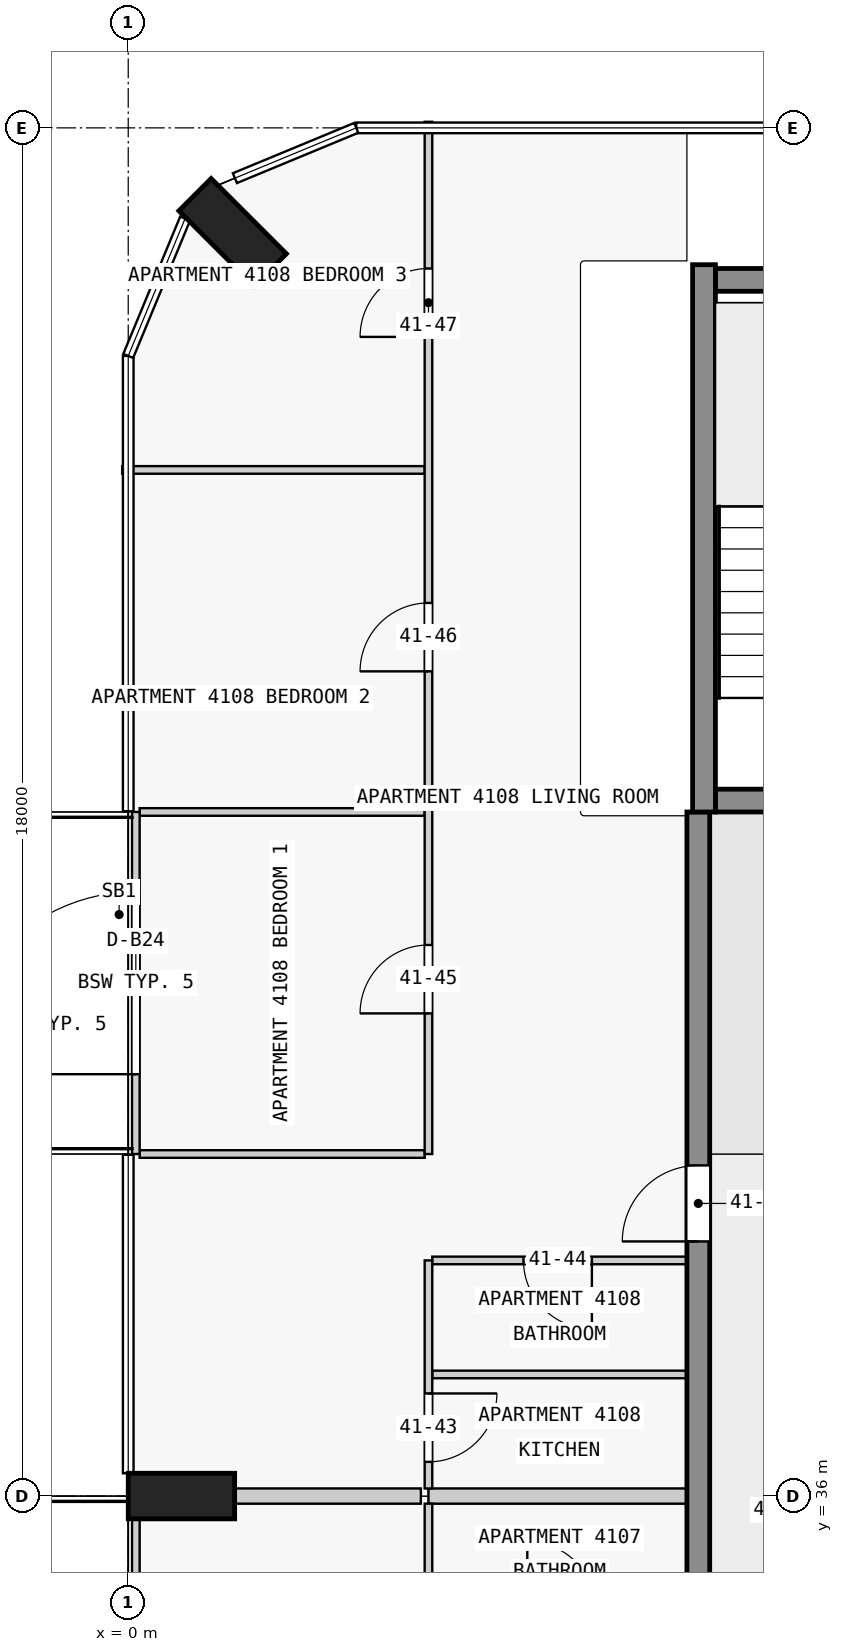
"""IFC4 building model, lengths in metres.
Left out: names, types, materials, properties, quantities, classifications, styles, units other than length and angle.
Written with IfcOpenShell. Run it as: python <this file> out.ifc"""

import sys

from ifc_helpers import new_model, si_unit, direction, frame, frame_2d, origin, origin_2d, place, context, subcontext, project, spatial, rectangle, extrude, element, fill, save


model = new_model("IFC4")
c1 = context("Model", 3, precision=1e-05, world=origin(), true_north=direction((0.0, 1.0)))
c2 = subcontext(c1, "Body", "Model", "MODEL_VIEW")
j1 = project(units=[si_unit("LENGTHUNIT", "METRE"), si_unit("PLANEANGLEUNIT", "RADIAN")], contexts=[c1])
p1 = place(None, origin())
s1 = spatial("IfcSite", under=j1, at=p1, CompositionType="ELEMENT")
p2 = place(p1, origin())
s2 = spatial("IfcBuilding", under=s1, at=p2, CompositionType="ELEMENT")
p3 = place(p2, frame((0.0, 0.0, 160.4)))
s3 = spatial("IfcBuildingStorey", under=s2, at=p3, CompositionType="ELEMENT", Elevation=160.4)
for number, where, z_axis, x_axis in (
    (1, (1.374, 52.626, 0.0), (0.0, 0.0, 1.0), (0.707, 0.707, 0.0)),
    (2, (0.7, 36.0, 0.0), (0.0, 0.0, 1.0), (0.0, 1.0, 0.0)),
):
    element("IfcColumn", number, at=place(p3, frame(where, z_axis=z_axis, x_axis=x_axis)), inside=s3, PredefinedType="COLUMN", context=c2, shape_type="SweptSolid", body=[
        extrude(rectangle(XDim=0.6, YDim=1.4, at=origin_2d()), origin(), (0.0, 0.0, 1.0), 3.5),
    ])
p4 = place(p3, frame((7.725, 45.15, 0.0), z_axis=(0.0, 0.0, 1.0), x_axis=(1.0, 0.0, 0.0)))
e3 = element("IfcWall", 3, at=p4, inside=s3, PredefinedType="SHEAR", context=c2, shape_type="SweptSolid", body=[
    extrude(rectangle(XDim=2.55, YDim=0.3, at=frame_2d((1.275, 0.0))), origin(), (0.0, 0.0, 1.0), 3.5),
])
p5 = place(p4, frame((0.725, 0.0, 0.0)))
e4 = element("IfcOpeningElement", 4, at=p5, cuts=e3, PredefinedType="OPENING", context=c2, shape_type="SweptSolid", body=[
    extrude(rectangle(XDim=1.1, YDim=2.1, at=frame_2d((0.55, 1.05))), frame((0.0, 0.16, 0.0), z_axis=(0.0, -1.0, 0.0), x_axis=(1.0, 0.0, 0.0)), (0.0, 0.0, 1.0), 0.32),
])
p6 = place(p3, frame((7.725, 52.0, 0.0), z_axis=(0.0, 0.0, 1.0), x_axis=(1.0, 0.0, 0.0)))
e5 = element("IfcWall", 5, at=p6, inside=s3, PredefinedType="SHEAR", context=c2, shape_type="SweptSolid", body=[
    extrude(rectangle(XDim=2.55, YDim=0.3, at=frame_2d((1.275, 0.0))), origin(), (0.0, 0.0, 1.0), 3.5),
])
p7 = place(p3, frame((7.575, 45.0, 0.0), z_axis=(0.0, 0.0, 1.0), x_axis=(0.0, 1.0, 0.0)))
e6 = element("IfcWall", 6, at=p7, inside=s3, PredefinedType="SHEAR", context=c2, shape_type="SweptSolid", body=[
    extrude(rectangle(XDim=7.2, YDim=0.3, at=frame_2d((3.6, 0.0))), origin(), (0.0, 0.0, 1.0), 3.5),
])
p8 = place(p3, frame((7.5, 18.0, 0.0), z_axis=(0.0, 0.0, 1.0), x_axis=(0.0, 1.0, 0.0)))
e7 = element("IfcWall", 7, at=p8, inside=s3, PredefinedType="SHEAR", context=c2, shape_type="SweptSolid", body=[
    extrude(rectangle(XDim=27.0, YDim=0.3, at=frame_2d((13.5, 0.0))), origin(), (0.0, 0.0, 1.0), 3.25),
])
p9 = place(p8, frame((1.75, 0.0, 0.0)))
e8 = element("IfcOpeningElement", 8, at=p9, cuts=e7, PredefinedType="OPENING", context=c2, shape_type="SweptSolid", body=[
    extrude(rectangle(XDim=1.0, YDim=2.1, at=frame_2d((0.5, 1.05))), frame((0.0, 0.16, 0.0), z_axis=(0.0, -1.0, 0.0), x_axis=(1.0, 0.0, 0.0)), (0.0, 0.0, 1.0), 0.32),
])
p10 = place(p8, frame((6.25, 0.0, 0.0)))
e9 = element("IfcOpeningElement", 9, at=p10, cuts=e7, PredefinedType="OPENING", context=c2, shape_type="SweptSolid", body=[
    extrude(rectangle(XDim=1.0, YDim=2.1, at=frame_2d((0.5, 1.05))), frame((0.0, 0.16, 0.0), z_axis=(0.0, -1.0, 0.0), x_axis=(1.0, 0.0, 0.0)), (0.0, 0.0, 1.0), 0.32),
])
p11 = place(p8, frame((10.75, 0.0, 0.0)))
e10 = element("IfcOpeningElement", 10, at=p11, cuts=e7, PredefinedType="OPENING", context=c2, shape_type="SweptSolid", body=[
    extrude(rectangle(XDim=1.0, YDim=2.1, at=frame_2d((0.5, 1.05))), frame((0.0, 0.16, 0.0), z_axis=(0.0, -1.0, 0.0), x_axis=(1.0, 0.0, 0.0)), (0.0, 0.0, 1.0), 0.32),
])
p12 = place(p8, frame((15.25, 0.0, 0.0)))
e11 = element("IfcOpeningElement", 11, at=p12, cuts=e7, PredefinedType="OPENING", context=c2, shape_type="SweptSolid", body=[
    extrude(rectangle(XDim=1.0, YDim=2.1, at=frame_2d((0.5, 1.05))), frame((0.0, 0.16, 0.0), z_axis=(0.0, -1.0, 0.0), x_axis=(1.0, 0.0, 0.0)), (0.0, 0.0, 1.0), 0.32),
])
p13 = place(p8, frame((21.35, 0.0, 0.0)))
e12 = element("IfcOpeningElement", 12, at=p13, cuts=e7, PredefinedType="OPENING", context=c2, shape_type="SweptSolid", body=[
    extrude(rectangle(XDim=1.0, YDim=2.1, at=frame_2d((0.5, 1.05))), frame((0.0, 0.16, 0.0), z_axis=(0.0, -1.0, 0.0), x_axis=(1.0, 0.0, 0.0)), (0.0, 0.0, 1.0), 0.32),
])
p14 = place(p3, frame((0.1, 31.5, 0.0), z_axis=(0.0, 0.0, 1.0), x_axis=(0.0, 1.0, 0.0)))
e13 = element("IfcWall", 13, at=p14, inside=s3, PredefinedType="STANDARD", context=c2, shape_type="SweptSolid", body=[
    extrude(rectangle(XDim=4.5, YDim=0.1, at=frame_2d((2.25, 0.0))), origin(), (0.0, 0.0, 1.0), 3.25),
])
p15 = place(p14, frame((1.05, 0.0, 0.0)))
e14 = element("IfcOpeningElement", 14, at=p15, cuts=e13, PredefinedType="OPENING", context=c2, shape_type="SweptSolid", body=[
    extrude(rectangle(XDim=2.4, YDim=2.4, at=frame_2d((1.2, 1.2))), frame((0.0, 0.06, 0.0), z_axis=(0.0, -1.0, 0.0), x_axis=(1.0, 0.0, 0.0)), (0.0, 0.0, 1.0), 0.12),
])
p16 = place(p3, frame((0.1, 40.5, 0.0), z_axis=(0.0, 0.0, 1.0), x_axis=(0.0, 1.0, 0.0)))
e15 = element("IfcWall", 15, at=p16, inside=s3, PredefinedType="STANDARD", context=c2, shape_type="SweptSolid", body=[
    extrude(rectangle(XDim=4.5, YDim=0.1, at=frame_2d((2.25, 0.0))), origin(), (0.0, 0.0, 1.0), 3.25),
])
p17 = place(p16, frame((1.05, 0.0, 0.0)))
e16 = element("IfcOpeningElement", 16, at=p17, cuts=e15, PredefinedType="OPENING", context=c2, shape_type="SweptSolid", body=[
    extrude(rectangle(XDim=2.4, YDim=2.4, at=frame_2d((1.2, 1.2))), frame((0.0, 0.06, 0.0), z_axis=(0.0, -1.0, 0.0), x_axis=(1.0, 0.0, 0.0)), (0.0, 0.0, 1.0), 0.12),
])
p18 = place(p3, frame((7.35, 36.0, 0.0), z_axis=(0.0, 0.0, 1.0), x_axis=(-1.0, 0.0, 0.0)))
e17 = element("IfcWall", 17, at=p18, inside=s3, PredefinedType="PARTITIONING", context=c2, shape_type="SweptSolid", body=[
    extrude(rectangle(XDim=3.4, YDim=0.2, at=frame_2d((1.7, 0.0))), origin(), (0.0, 0.0, 1.0), 3.25),
])
p19 = place(p3, frame((1.4, 36.0, 0.0), z_axis=(0.0, 0.0, 1.0), x_axis=(1.0, 0.0, 0.0)))
e18 = element("IfcWall", 18, at=p19, inside=s3, PredefinedType="PARTITIONING", context=c2, shape_type="SweptSolid", body=[
    extrude(rectangle(XDim=2.45, YDim=0.2, at=frame_2d((1.225, 0.0))), origin(), (0.0, 0.0, 1.0), 3.25),
])
p20 = place(p3, frame((7.35, 37.6, 0.0), z_axis=(0.0, 0.0, 1.0), x_axis=(-1.0, 0.0, 0.0)))
e19 = element("IfcWall", 19, at=p20, inside=s3, PredefinedType="PARTITIONING", context=c2, shape_type="SweptSolid", body=[
    extrude(rectangle(XDim=3.35, YDim=0.1, at=frame_2d((1.675, 0.0))), origin(), (0.0, 0.0, 1.0), 3.25),
])
p21 = place(p3, frame((7.35, 39.1, 0.0), z_axis=(0.0, 0.0, 1.0), x_axis=(-1.0, 0.0, 0.0)))
e20 = element("IfcWall", 20, at=p21, inside=s3, PredefinedType="PARTITIONING", context=c2, shape_type="SweptSolid", body=[
    extrude(rectangle(XDim=3.35, YDim=0.1, at=frame_2d((1.675, 0.0))), origin(), (0.0, 0.0, 1.0), 3.25),
])
p22 = place(p21, frame((1.25, 0.0, 0.0)))
e21 = element("IfcOpeningElement", 21, at=p22, cuts=e20, PredefinedType="OPENING", context=c2, shape_type="SweptSolid", body=[
    extrude(rectangle(XDim=0.9, YDim=2.1, at=frame_2d((0.45, 1.05))), frame((0.0, 0.06, 0.0), z_axis=(0.0, -1.0, 0.0), x_axis=(1.0, 0.0, 0.0)), (0.0, 0.0, 1.0), 0.12),
])
for number, where, z_axis, x_axis in (
    (22, (0.15, 40.5, 0.0), (0.0, 0.0, 1.0), (1.0, 0.0, 0.0)),
    (23, (3.9, 45.0, 0.0), (0.0, 0.0, 1.0), (-1.0, 0.0, 0.0)),
):
    element("IfcWall", number, at=place(p3, frame(where, z_axis=z_axis, x_axis=x_axis)), inside=s3, PredefinedType="PARTITIONING", context=c2, shape_type="SweptSolid", body=[
        extrude(rectangle(XDim=3.75, YDim=0.1, at=frame_2d((1.875, 0.0))), origin(), (0.0, 0.0, 1.0), 3.25),
    ])
p23 = place(p3, frame((3.9, 49.5, 0.0), z_axis=(0.0, 0.0, 1.0), x_axis=(-1.0, 0.0, 0.0)))
e24 = element("IfcWall", 24, at=p23, inside=s3, PredefinedType="PARTITIONING", context=c2, shape_type="SweptSolid", body=[
    extrude(rectangle(XDim=3.98, YDim=0.1, at=frame_2d((1.99, 0.0))), origin(), (0.0, 0.0, 1.0), 3.25),
])
p24 = place(p3, frame((3.95, 35.9, 0.0), z_axis=(0.0, 0.0, 1.0), x_axis=(0.0, -1.0, 0.0)))
e25 = element("IfcWall", 25, at=p24, inside=s3, PredefinedType="PARTITIONING", context=c2, shape_type="SweptSolid", body=[
    extrude(rectangle(XDim=1.4, YDim=0.1, at=frame_2d((0.7, 0.0))), origin(), (0.0, 0.0, 1.0), 3.25),
])
p25 = place(p3, frame((3.95, 39.1, 0.0), z_axis=(0.0, 0.0, 1.0), x_axis=(0.0, -1.0, 0.0)))
e26 = element("IfcWall", 26, at=p25, inside=s3, PredefinedType="PARTITIONING", context=c2, shape_type="SweptSolid", body=[
    extrude(rectangle(XDim=3.0, YDim=0.1, at=frame_2d((1.5, 0.0))), origin(), (0.0, 0.0, 1.0), 3.25),
])
p26 = place(p25, frame((1.75, 0.0, 0.0)))
e27 = element("IfcOpeningElement", 27, at=p26, cuts=e26, PredefinedType="OPENING", context=c2, shape_type="SweptSolid", body=[
    extrude(rectangle(XDim=0.9, YDim=2.1, at=frame_2d((0.45, 1.05))), frame((0.0, 0.06, 0.0), z_axis=(0.0, -1.0, 0.0), x_axis=(1.0, 0.0, 0.0)), (0.0, 0.0, 1.0), 0.12),
])
p27 = place(p3, frame((3.95, 40.5, 0.0), z_axis=(0.0, 0.0, 1.0), x_axis=(0.0, 1.0, 0.0)))
e28 = element("IfcWall", 28, at=p27, inside=s3, PredefinedType="PARTITIONING", context=c2, shape_type="SweptSolid", body=[
    extrude(rectangle(XDim=13.58, YDim=0.1, at=frame_2d((6.79, 0.0))), origin(), (0.0, 0.0, 1.0), 3.25),
])
p28 = place(p27, frame((1.85, 0.0, 0.0)))
e29 = element("IfcOpeningElement", 29, at=p28, cuts=e28, PredefinedType="OPENING", context=c2, shape_type="SweptSolid", body=[
    extrude(rectangle(XDim=0.9, YDim=2.1, at=frame_2d((0.45, 1.05))), frame((0.0, 0.06, 0.0), z_axis=(0.0, -1.0, 0.0), x_axis=(1.0, 0.0, 0.0)), (0.0, 0.0, 1.0), 0.12),
])
p29 = place(p27, frame((6.35, 0.0, 0.0)))
e30 = element("IfcOpeningElement", 30, at=p29, cuts=e28, PredefinedType="OPENING", context=c2, shape_type="SweptSolid", body=[
    extrude(rectangle(XDim=0.9, YDim=2.1, at=frame_2d((0.45, 1.05))), frame((0.0, 0.06, 0.0), z_axis=(0.0, -1.0, 0.0), x_axis=(1.0, 0.0, 0.0)), (0.0, 0.0, 1.0), 0.12),
])
p30 = place(p27, frame((10.75, 0.0, 0.0)))
e31 = element("IfcOpeningElement", 31, at=p30, cuts=e28, PredefinedType="OPENING", context=c2, shape_type="SweptSolid", body=[
    extrude(rectangle(XDim=0.9, YDim=2.1, at=frame_2d((0.45, 1.05))), frame((0.0, 0.06, 0.0), z_axis=(0.0, -1.0, 0.0), x_axis=(1.0, 0.0, 0.0)), (0.0, 0.0, 1.0), 0.12),
])
p31 = place(p17, origin())
e32 = element("IfcDoor", 32, at=p31, inside=s3, OperationType="SINGLE_SWING_LEFT", PredefinedType="DOOR", context=c2, shape_type="SweptSolid", body=[
    extrude(rectangle(XDim=2.4, YDim=2.4, at=frame_2d((1.2, 1.2))), frame((0.0, 0.025, 0.0), z_axis=(0.0, -1.0, 0.0), x_axis=(1.0, 0.0, 0.0)), (0.0, 0.0, 1.0), 0.05),
])
fill(e16, e32)
p32 = place(p13, origin())
e33 = element("IfcDoor", 33, at=p32, inside=s3, OperationType="SINGLE_SWING_RIGHT", PredefinedType="DOOR", context=c2, shape_type="SweptSolid", body=[
    extrude(rectangle(XDim=1.0, YDim=2.1, at=frame_2d((0.5, 1.05))), frame((0.0, 0.025, 0.0), z_axis=(0.0, -1.0, 0.0), x_axis=(1.0, 0.0, 0.0)), (0.0, 0.0, 1.0), 0.05),
])
fill(e12, e33)
p33 = place(p26, origin())
e34 = element("IfcDoor", 34, at=p33, inside=s3, OperationType="SINGLE_SWING_RIGHT", PredefinedType="DOOR", context=c2, shape_type="SweptSolid", body=[
    extrude(rectangle(XDim=0.9, YDim=2.1, at=frame_2d((0.45, 1.05))), frame((0.0, 0.025, 0.0), z_axis=(0.0, -1.0, 0.0), x_axis=(1.0, 0.0, 0.0)), (0.0, 0.0, 1.0), 0.05),
])
fill(e27, e34)
p34 = place(p22, origin())
e35 = element("IfcDoor", 35, at=p34, inside=s3, OperationType="SINGLE_SWING_RIGHT", PredefinedType="DOOR", context=c2, shape_type="SweptSolid", body=[
    extrude(rectangle(XDim=0.9, YDim=2.1, at=frame_2d((0.45, 1.05))), frame((0.0, 0.025, 0.0), z_axis=(0.0, -1.0, 0.0), x_axis=(1.0, 0.0, 0.0)), (0.0, 0.0, 1.0), 0.05),
])
fill(e21, e35)
p35 = place(p28, origin())
e36 = element("IfcDoor", 36, at=p35, inside=s3, OperationType="SINGLE_SWING_LEFT", PredefinedType="DOOR", context=c2, shape_type="SweptSolid", body=[
    extrude(rectangle(XDim=0.9, YDim=2.1, at=frame_2d((0.45, 1.05))), frame((0.0, 0.025, 0.0), z_axis=(0.0, -1.0, 0.0), x_axis=(1.0, 0.0, 0.0)), (0.0, 0.0, 1.0), 0.05),
])
fill(e29, e36)
p36 = place(p29, origin())
e37 = element("IfcDoor", 37, at=p36, inside=s3, OperationType="SINGLE_SWING_RIGHT", PredefinedType="DOOR", context=c2, shape_type="SweptSolid", body=[
    extrude(rectangle(XDim=0.9, YDim=2.1, at=frame_2d((0.45, 1.05))), frame((0.0, 0.025, 0.0), z_axis=(0.0, -1.0, 0.0), x_axis=(1.0, 0.0, 0.0)), (0.0, 0.0, 1.0), 0.05),
])
fill(e30, e37)
p37 = place(p30, origin())
e38 = element("IfcDoor", 38, at=p37, inside=s3, OperationType="SINGLE_SWING_RIGHT", PredefinedType="DOOR", context=c2, shape_type="SweptSolid", body=[
    extrude(rectangle(XDim=0.9, YDim=2.1, at=frame_2d((0.45, 1.05))), frame((0.0, 0.025, 0.0), z_axis=(0.0, -1.0, 0.0), x_axis=(1.0, 0.0, 0.0)), (0.0, 0.0, 1.0), 0.05),
])
fill(e31, e38)
save(model, sys.argv[1])
